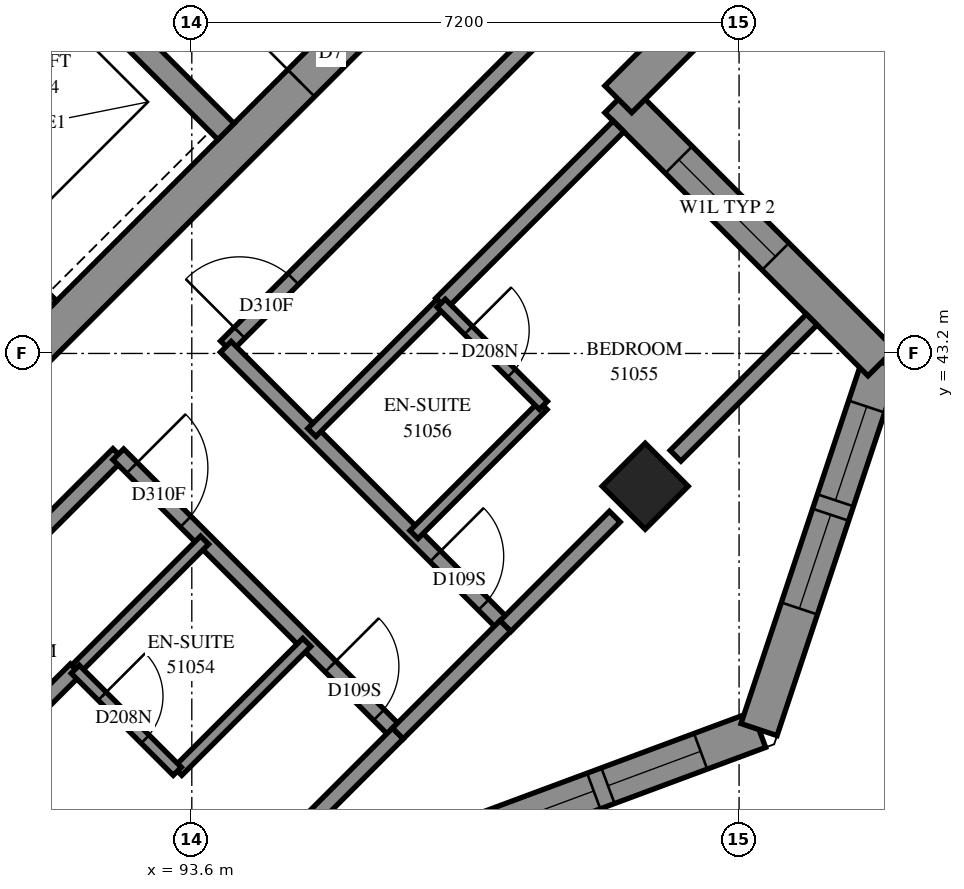
"""IFC4 building model, lengths in metres.
Left out: names, types, materials, properties, quantities, classifications, styles, units other than length and angle.
Written with IfcOpenShell. Run it as: python <this file> out.ifc"""

import sys

from ifc_helpers import new_model, si_unit, direction, frame, frame_2d, origin, origin_2d, place, context, subcontext, project, spatial, polyline, rectangle, outline, extrude, element, fill, save


model = new_model("IFC4")
c1 = context("Model", 3, precision=1e-05, world=origin(), true_north=direction((0.0, 1.0)))
c2 = subcontext(c1, "Body", "Model", "MODEL_VIEW")
j1 = project(units=[si_unit("LENGTHUNIT", "METRE"), si_unit("PLANEANGLEUNIT", "RADIAN")], contexts=[c1])
p1 = place(None, origin())
s1 = spatial("IfcSite", under=j1, at=p1, CompositionType="ELEMENT")
p2 = place(p1, origin())
s2 = spatial("IfcBuilding", under=s1, at=p2, CompositionType="ELEMENT")
p3 = place(p2, frame((0.0, 0.0, 189.6)))
s3 = spatial("IfcBuildingStorey", under=s2, at=p3, CompositionType="ELEMENT", Elevation=189.6)
p4 = place(p3, frame((99.565, 41.453, 0.0), z_axis=(0.0, 0.0, 1.0), x_axis=(0.7071067812, -0.7071067812, 0.0)))
e1 = element("IfcColumn", 1, at=p4, inside=s3, PredefinedType="COLUMN", context=c2, shape_type="SweptSolid", body=[
    extrude(rectangle(XDim=0.8, YDim=0.8, at=origin_2d()), origin(), (0.0, 0.0, 1.0), 3.1),
])
p5 = place(p3, frame((87.013, 38.731, -0.3), z_axis=(0.0, 0.0, 1.0), x_axis=(0.7071067812, 0.7071067812, 0.0)))
e2 = element("IfcWall", 2, at=p5, inside=s3, PredefinedType="SHEAR", context=c2, shape_type="SweptSolid", body=[
    extrude(rectangle(XDim=14.4, YDim=0.5, at=frame_2d((7.2, 0.0))), origin(), (0.0, 0.0, 1.0), 2.7),
])
p6 = place(p5, frame((4.55, 0.0, 0.3)))
e3 = element("IfcOpeningElement", 3, at=p6, cuts=e2, PredefinedType="OPENING", context=c2, shape_type="SweptSolid", body=[
    extrude(rectangle(XDim=1.1, YDim=2.1, at=frame_2d((0.55, 1.05))), frame((0.0, 0.26, 0.0), z_axis=(0.0, -1.0, 0.0), x_axis=(1.0, 0.0, 0.0)), (0.0, 0.0, 1.0), 0.52),
])
p7 = place(p5, frame((11.35, 0.0, 0.3)))
e4 = element("IfcOpeningElement", 4, at=p7, cuts=e2, PredefinedType="OPENING", context=c2, shape_type="SweptSolid", body=[
    extrude(rectangle(XDim=1.1, YDim=2.1, at=frame_2d((0.55, 1.05))), frame((0.0, 0.26, 0.0), z_axis=(0.0, -1.0, 0.0), x_axis=(1.0, 0.0, 0.0)), (0.0, 0.0, 1.0), 0.52),
])
p8 = place(p3, frame((81.534, 53.969, 0.0), z_axis=(0.0, 0.0, 1.0), x_axis=(0.707103309, -0.7071102534, 0.0)))
e5 = element("IfcWall", 5, at=p8, inside=s3, PredefinedType="SOLIDWALL", context=c2, shape_type="SweptSolid", body=[
    extrude(rectangle(XDim=14.4, YDim=0.3, at=frame_2d((7.2, 0.0))), origin(), (0.0, 0.0, 1.0), 3.1),
])
p9 = place(p8, frame((1.25, 0.0, 0.0)))
e6 = element("IfcOpeningElement", 6, at=p9, cuts=e5, PredefinedType="OPENING", context=c2, shape_type="SweptSolid", body=[
    extrude(rectangle(XDim=1.1, YDim=2.1, at=frame_2d((0.55, 1.05))), frame((0.0, 0.16, 0.0), z_axis=(0.0, -1.0, 0.0), x_axis=(1.0, 0.0, 0.0)), (0.0, 0.0, 1.0), 0.32),
])
p10 = place(p8, frame((4.85, 0.0, 0.0)))
e7 = element("IfcOpeningElement", 7, at=p10, cuts=e5, PredefinedType="OPENING", context=c2, shape_type="SweptSolid", body=[
    extrude(rectangle(XDim=1.1, YDim=2.1, at=frame_2d((0.55, 1.05))), frame((0.0, 0.16, 0.0), z_axis=(0.0, -1.0, 0.0), x_axis=(1.0, 0.0, 0.0)), (0.0, 0.0, 1.0), 0.32),
])
p11 = place(p8, frame((8.45, 0.0, 0.0)))
e8 = element("IfcOpeningElement", 8, at=p11, cuts=e5, PredefinedType="OPENING", context=c2, shape_type="SweptSolid", body=[
    extrude(rectangle(XDim=1.1, YDim=2.1, at=frame_2d((0.55, 1.05))), frame((0.0, 0.16, 0.0), z_axis=(0.0, -1.0, 0.0), x_axis=(1.0, 0.0, 0.0)), (0.0, 0.0, 1.0), 0.32),
])
p12 = place(p8, frame((12.05, 0.0, 0.0)))
e9 = element("IfcOpeningElement", 9, at=p12, cuts=e5, PredefinedType="OPENING", context=c2, shape_type="SweptSolid", body=[
    extrude(rectangle(XDim=1.1, YDim=2.1, at=frame_2d((0.55, 1.05))), frame((0.0, 0.16, 0.0), z_axis=(0.0, -1.0, 0.0), x_axis=(1.0, 0.0, 0.0)), (0.0, 0.0, 1.0), 0.32),
])
p13 = place(p3, frame((88.958, 51.211, 0.0), z_axis=(0.0, 0.0, 1.0), x_axis=(0.7070998367, -0.7071137256, 0.0)))
e10 = element("IfcWall", 10, at=p13, inside=s3, PredefinedType="SOLIDWALL", context=c2, shape_type="SweptSolid", body=[
    extrude(rectangle(XDim=7.2, YDim=0.3, at=frame_2d((3.6, 0.0))), origin(), (0.0, 0.0, 1.0), 3.1),
])
p14 = place(p3, frame((96.118, 36.415, 0.0), z_axis=(0.0, 0.0, 1.0), x_axis=(0.9374238577, 0.3481903374, 0.0)))
e11 = element("IfcWall", 11, at=p14, inside=s3, PredefinedType="SOLIDWALL", context=c2, shape_type="SweptSolid", body=[
    extrude(outline(polyline([(0.115, -0.25), (5.395, -0.25), (5.155, 0.25), (-0.115, 0.25), (0.115, -0.25)])), origin(), (0.0, 0.0, 1.0), 3.1),
])
p15 = place(p14, frame((1.655, 0.0, 0.45)))
e12 = element("IfcOpeningElement", 12, at=p15, cuts=e11, PredefinedType="OPENING", context=c2, shape_type="SweptSolid", body=[
    extrude(rectangle(XDim=1.3, YDim=2.5, at=frame_2d((0.65, 1.25))), frame((0.0, 0.26, 0.0), z_axis=(0.0, -1.0, 0.0), x_axis=(1.0, 0.0, 0.0)), (0.0, 0.0, 1.0), 0.52),
])
p16 = place(p14, frame((3.155, 0.0, 0.45)))
e13 = element("IfcOpeningElement", 13, at=p16, cuts=e11, PredefinedType="OPENING", context=c2, shape_type="SweptSolid", body=[
    extrude(rectangle(XDim=1.3, YDim=2.5, at=frame_2d((0.65, 1.25))), frame((0.0, 0.26, 0.0), z_axis=(0.0, -1.0, 0.0), x_axis=(1.0, 0.0, 0.0)), (0.0, 0.0, 1.0), 0.52),
])
p17 = place(p3, frame((101.062, 38.252, 0.0), z_axis=(0.0, 0.0, 1.0), x_axis=(0.3162395484, 0.9486793705, 0.0)))
e14 = element("IfcWall", 14, at=p17, inside=s3, PredefinedType="SOLIDWALL", context=c2, shape_type="SweptSolid", body=[
    extrude(outline(polyline([(-0.12, -0.25), (5.247, -0.25), (4.938, 0.25), (0.12, 0.25), (-0.12, -0.25)])), origin(), (0.0, 0.0, 1.0), 3.1),
])
p18 = place(p17, frame((1.68, 0.0, 0.45)))
e15 = element("IfcOpeningElement", 15, at=p18, cuts=e14, PredefinedType="OPENING", context=c2, shape_type="SweptSolid", body=[
    extrude(rectangle(XDim=1.3, YDim=2.5, at=frame_2d((0.65, 1.25))), frame((0.0, 0.26, 0.0), z_axis=(0.0, -1.0, 0.0), x_axis=(1.0, 0.0, 0.0)), (0.0, 0.0, 1.0), 0.52),
])
p19 = place(p17, frame((3.18, 0.0, 0.45)))
e16 = element("IfcOpeningElement", 16, at=p19, cuts=e14, PredefinedType="OPENING", context=c2, shape_type="SweptSolid", body=[
    extrude(rectangle(XDim=1.3, YDim=2.5, at=frame_2d((0.65, 1.25))), frame((0.0, 0.26, 0.0), z_axis=(0.0, -1.0, 0.0), x_axis=(1.0, 0.0, 0.0)), (0.0, 0.0, 1.0), 0.52),
])
p20 = place(p3, frame((102.673, 43.083, 0.0), z_axis=(0.0, 0.0, 1.0), x_axis=(-0.7071067812, 0.7071067812, 0.0)))
e17 = element("IfcWall", 17, at=p20, inside=s3, PredefinedType="SOLIDWALL", context=c2, shape_type="SweptSolid", body=[
    extrude(outline(polyline([(-0.154, -0.25), (4.646, -0.25), (5.146, 0.25), (0.154, 0.25), (-0.154, -0.25)])), origin(), (0.0, 0.0, 1.0), 3.1),
])
p21 = place(p20, frame((1.97, 0.0, 0.6)))
e18 = element("IfcOpeningElement", 18, at=p21, cuts=e17, PredefinedType="OPENING", context=c2, shape_type="SweptSolid", body=[
    extrude(rectangle(XDim=1.8, YDim=1.9, at=frame_2d((0.9, 0.95))), frame((0.0, 0.26, 0.0), z_axis=(0.0, -1.0, 0.0), x_axis=(1.0, 0.0, 0.0)), (0.0, 0.0, 1.0), 0.52),
])
p22 = place(p3, frame((99.211, 46.544, 0.0), z_axis=(0.0, 0.0, 1.0), x_axis=(0.7071156725, 0.7070978897, 0.0)))
e19 = element("IfcWall", 19, at=p22, inside=s3, PredefinedType="SOLIDWALL", context=c2, shape_type="SweptSolid", body=[
    extrude(outline(polyline([(0.25, -0.25), (5.95, -0.25), (5.297, 0.25), (-0.25, 0.25), (0.25, -0.25)])), origin(), (0.0, 0.0, 1.0), 3.1),
])
p23 = place(p22, frame((1.125, 0.0, 0.6)))
e20 = element("IfcOpeningElement", 20, at=p23, cuts=e19, PredefinedType="OPENING", context=c2, shape_type="SweptSolid", body=[
    extrude(rectangle(XDim=1.8, YDim=1.9, at=frame_2d((0.9, 0.95))), frame((0.0, 0.26, 0.0), z_axis=(0.0, -1.0, 0.0), x_axis=(1.0, 0.0, 0.0)), (0.0, 0.0, 1.0), 0.52),
])
p24 = place(p3, frame((84.971, 31.945, 0.0), z_axis=(0.0, 0.0, 1.0), x_axis=(0.7072312442, 0.7069822963, 0.0)))
e21 = element("IfcWall", 21, at=p24, inside=s3, PredefinedType="PARTITIONING", context=c2, shape_type="SweptSolid", body=[
    extrude(rectangle(XDim=10.042, YDim=0.2, at=frame_2d((5.021, 0.0))), origin(), (0.0, 0.0, 1.0), 3.1),
])
p25 = place(p3, frame((94.049, 43.293, 0.0), z_axis=(0.0, 0.0, 1.0), x_axis=(0.7071067812, 0.7071067812, 0.0)))
e22 = element("IfcWall", 22, at=p25, inside=s3, PredefinedType="PARTITIONING", context=c2, shape_type="SweptSolid", body=[
    extrude(rectangle(XDim=8.2, YDim=0.2, at=frame_2d((4.1, 0.0))), origin(), (0.0, 0.0, 1.0), 3.1),
])
p26 = place(p25, frame((0.252, 0.0, 0.0)))
e23 = element("IfcOpeningElement", 23, at=p26, cuts=e22, PredefinedType="OPENING", context=c2, shape_type="SweptSolid", body=[
    extrude(rectangle(XDim=1.0, YDim=2.1, at=frame_2d((0.5, 1.05))), frame((0.0, 0.11, 0.0), z_axis=(0.0, -1.0, 0.0), x_axis=(1.0, 0.0, 0.0)), (0.0, 0.0, 1.0), 0.22),
])
p27 = place(p3, frame((86.835, 36.079, 0.0), z_axis=(0.0, 0.0, 1.0), x_axis=(0.7071067812, 0.7071067812, 0.0)))
e24 = element("IfcWall", 24, at=p27, inside=s3, PredefinedType="PARTITIONING", context=c2, shape_type="SweptSolid", body=[
    extrude(rectangle(XDim=8.2, YDim=0.2, at=frame_2d((4.1, 0.0))), origin(), (0.0, 0.0, 1.0), 3.1),
])
p28 = place(p3, frame((94.047, 43.287, 0.0), z_axis=(0.0, 0.0, 1.0), x_axis=(0.7071067812, -0.7071067812, 0.0)))
e25 = element("IfcWall", 25, at=p28, inside=s3, PredefinedType="PARTITIONING", context=c2, shape_type="SweptSolid", body=[
    extrude(rectangle(XDim=5.199, YDim=0.2, at=frame_2d((2.599, 0.0))), origin(), (0.0, 0.0, 1.0), 3.1),
])
p29 = place(p28, frame((3.898, 0.0, 0.0)))
e26 = element("IfcOpeningElement", 26, at=p29, cuts=e25, PredefinedType="OPENING", context=c2, shape_type="SweptSolid", body=[
    extrude(rectangle(XDim=0.9, YDim=2.1, at=frame_2d((0.45, 1.05))), frame((0.0, 0.11, 0.0), z_axis=(0.0, -1.0, 0.0), x_axis=(1.0, 0.0, 0.0)), (0.0, 0.0, 1.0), 0.22),
])
p30 = place(p3, frame((92.633, 41.873, 0.0), z_axis=(0.0, 0.0, 1.0), x_axis=(0.7071067812, -0.7071067812, 0.0)))
e27 = element("IfcWall", 27, at=p30, inside=s3, PredefinedType="PARTITIONING", context=c2, shape_type="SweptSolid", body=[
    extrude(rectangle(XDim=5.199, YDim=0.2, at=frame_2d((2.599, 0.0))), origin(), (0.0, 0.0, 1.0), 3.1),
])
p31 = place(p30, frame((0.253, 0.0, 0.0)))
e28 = element("IfcOpeningElement", 28, at=p31, cuts=e27, PredefinedType="OPENING", context=c2, shape_type="SweptSolid", body=[
    extrude(rectangle(XDim=1.0, YDim=2.1, at=frame_2d((0.5, 1.05))), frame((0.0, 0.11, 0.0), z_axis=(0.0, -1.0, 0.0), x_axis=(1.0, 0.0, 0.0)), (0.0, 0.0, 1.0), 0.22),
])
p32 = place(p30, frame((3.948, 0.0, 0.0)))
e29 = element("IfcOpeningElement", 29, at=p32, cuts=e27, PredefinedType="OPENING", context=c2, shape_type="SweptSolid", body=[
    extrude(rectangle(XDim=0.9, YDim=2.1, at=frame_2d((0.45, 1.05))), frame((0.0, 0.11, 0.0), z_axis=(0.0, -1.0, 0.0), x_axis=(1.0, 0.0, 0.0)), (0.0, 0.0, 1.0), 0.22),
])
p33 = place(p3, frame((96.88, 43.856, 0.0), z_axis=(0.0, 0.0, 1.0), x_axis=(0.7074098182, 0.7068036142, 0.0)))
e30 = element("IfcWall", 30, at=p33, inside=s3, PredefinedType="PARTITIONING", context=c2, shape_type="SweptSolid", body=[
    extrude(rectangle(XDim=3.299, YDim=0.2, at=frame_2d((1.65, 0.0))), origin(), (0.0, 0.0, 1.0), 3.1),
])
p34 = place(p3, frame((99.964, 41.854, 0.0), z_axis=(0.0, 0.0, 1.0), x_axis=(0.7071265121, 0.7070870497, 0.0)))
e31 = element("IfcWall", 31, at=p34, inside=s3, PredefinedType="PARTITIONING", context=c2, shape_type="SweptSolid", body=[
    extrude(rectangle(XDim=2.534, YDim=0.2, at=frame_2d((1.267, 0.0))), origin(), (0.0, 0.0, 1.0), 3.1),
])
for number, where, z_axis, x_axis in (
    (32, (96.523, 40.817, 0.0), (0.0, 0.0, 1.0), (0.707, 0.707, 0.0)),
    (33, (95.179, 42.161, 0.0), (0.0, 0.0, 1.0), (0.707, 0.707, 0.0)),
):
    element("IfcWall", number, at=place(p3, frame(where, z_axis=z_axis, x_axis=x_axis)), inside=s3, PredefinedType="PARTITIONING", context=c2, shape_type="SweptSolid", body=[
        extrude(rectangle(XDim=2.401, YDim=0.15, at=frame_2d((1.201, 0.0))), origin(), (0.0, 0.0, 1.0), 3.1),
    ])
for number, where, z_axis, x_axis in (
    (34, (92.072, 39.046, 0.0), (0.0, 0.0, 1.0), (0.707, 0.708, 0.0)),
    (35, (93.415, 37.703, 0.0), (0.0, 0.0, 1.0), (0.708, 0.707, 0.0)),
):
    element("IfcWall", number, at=place(p3, frame(where, z_axis=z_axis, x_axis=x_axis)), inside=s3, PredefinedType="PARTITIONING", context=c2, shape_type="SweptSolid", body=[
        extrude(rectangle(XDim=2.4, YDim=0.15, at=frame_2d((1.2, 0.0))), origin(), (0.0, 0.0, 1.0), 3.1),
    ])
p35 = place(p3, frame((97.727, 39.613, 0.0), z_axis=(0.0, 0.0, 1.0), x_axis=(0.7066152229, 0.7075979979, 0.0)))
e36 = element("IfcWall", 36, at=p35, inside=s3, PredefinedType="PARTITIONING", context=c2, shape_type="SweptSolid", body=[
    extrude(rectangle(XDim=2.035, YDim=0.2, at=frame_2d((1.018, 0.0))), origin(), (0.0, 0.0, 1.0), 2.6),
])
p36 = place(p3, frame((94.873, 36.763, 0.0), z_axis=(0.0, 0.0, 1.0), x_axis=(0.7071067812, 0.7071067812, 0.0)))
e37 = element("IfcWall", 37, at=p36, inside=s3, PredefinedType="PARTITIONING", context=c2, shape_type="SweptSolid", body=[
    extrude(rectangle(XDim=2.034, YDim=0.2, at=frame_2d((1.017, 0.0))), origin(), (0.0, 0.0, 1.0), 2.6),
])
p37 = place(p3, frame((96.311, 38.201, 0.0), z_axis=(0.0, 0.0, 1.0), x_axis=(0.7071067812, 0.7071067812, 0.0)))
e38 = element("IfcWall", 38, at=p37, inside=s3, PredefinedType="PARTITIONING", context=c2, shape_type="SweptSolid", body=[
    extrude(rectangle(XDim=2.0, YDim=0.2, at=frame_2d((1.0, 0.0))), origin(), (0.0, 0.0, 1.0), 2.6),
])
p38 = place(p3, frame((96.881, 43.861, 0.0), z_axis=(0.0, 0.0, 1.0), x_axis=(0.7071067812, -0.7071067812, 0.0)))
e39 = element("IfcWall", 39, at=p38, inside=s3, PredefinedType="PARTITIONING", context=c2, shape_type="SweptSolid", body=[
    extrude(rectangle(XDim=1.901, YDim=0.15, at=frame_2d((0.95, 0.0))), origin(), (0.0, 0.0, 1.0), 3.1),
])
p39 = place(p38, frame((0.505, 0.0, 0.0)))
e40 = element("IfcOpeningElement", 40, at=p39, cuts=e39, PredefinedType="OPENING", context=c2, shape_type="SweptSolid", body=[
    extrude(rectangle(XDim=0.8, YDim=2.1, at=frame_2d((0.4, 1.05))), frame((0.0, 0.085, 0.0), z_axis=(0.0, -1.0, 0.0), x_axis=(1.0, 0.0, 0.0)), (0.0, 0.0, 1.0), 0.17),
])
p40 = place(p3, frame((92.067, 39.045, 0.0), z_axis=(0.0, 0.0, 1.0), x_axis=(0.7071067812, -0.7071067812, 0.0)))
e41 = element("IfcWall", 41, at=p40, inside=s3, PredefinedType="PARTITIONING", context=c2, shape_type="SweptSolid", body=[
    extrude(rectangle(XDim=1.898, YDim=0.15, at=frame_2d((0.949, 0.0))), origin(), (0.0, 0.0, 1.0), 3.1),
])
p41 = place(p40, frame((0.501, 0.0, 0.0)))
e42 = element("IfcOpeningElement", 42, at=p41, cuts=e41, PredefinedType="OPENING", context=c2, shape_type="SweptSolid", body=[
    extrude(rectangle(XDim=0.8, YDim=2.1, at=frame_2d((0.4, 1.05))), frame((0.0, 0.085, 0.0), z_axis=(0.0, -1.0, 0.0), x_axis=(1.0, 0.0, 0.0)), (0.0, 0.0, 1.0), 0.17),
])
p42 = place(p15, origin())
e43 = element("IfcWindow", 43, at=p42, inside=s3, PartitioningType="SINGLE_PANEL", PredefinedType="WINDOW", context=c2, shape_type="SweptSolid", body=[
    extrude(rectangle(XDim=1.3, YDim=2.5, at=frame_2d((0.65, 1.25))), frame((0.0, 0.18, 0.0), z_axis=(0.0, -1.0, 0.0), x_axis=(1.0, 0.0, 0.0)), (0.0, 0.0, 1.0), 0.06),
])
fill(e12, e43)
p43 = place(p16, origin())
e44 = element("IfcWindow", 44, at=p43, inside=s3, PartitioningType="SINGLE_PANEL", PredefinedType="WINDOW", context=c2, shape_type="SweptSolid", body=[
    extrude(rectangle(XDim=1.3, YDim=2.5, at=frame_2d((0.65, 1.25))), frame((0.0, 0.18, 0.0), z_axis=(0.0, -1.0, 0.0), x_axis=(1.0, 0.0, 0.0)), (0.0, 0.0, 1.0), 0.06),
])
fill(e13, e44)
p44 = place(p18, origin())
e45 = element("IfcWindow", 45, at=p44, inside=s3, PartitioningType="SINGLE_PANEL", PredefinedType="WINDOW", context=c2, shape_type="SweptSolid", body=[
    extrude(rectangle(XDim=1.3, YDim=2.5, at=frame_2d((0.65, 1.25))), frame((0.0, 0.18, 0.0), z_axis=(0.0, -1.0, 0.0), x_axis=(1.0, 0.0, 0.0)), (0.0, 0.0, 1.0), 0.06),
])
fill(e15, e45)
p45 = place(p19, origin())
e46 = element("IfcWindow", 46, at=p45, inside=s3, PartitioningType="SINGLE_PANEL", PredefinedType="WINDOW", context=c2, shape_type="SweptSolid", body=[
    extrude(rectangle(XDim=1.3, YDim=2.5, at=frame_2d((0.65, 1.25))), frame((0.0, 0.18, 0.0), z_axis=(0.0, -1.0, 0.0), x_axis=(1.0, 0.0, 0.0)), (0.0, 0.0, 1.0), 0.06),
])
fill(e16, e46)
p46 = place(p21, origin())
e47 = element("IfcWindow", 47, at=p46, inside=s3, PartitioningType="SINGLE_PANEL", PredefinedType="WINDOW", context=c2, shape_type="SweptSolid", body=[
    extrude(rectangle(XDim=1.8, YDim=1.9, at=frame_2d((0.9, 0.95))), frame((0.0, 0.18, 0.0), z_axis=(0.0, -1.0, 0.0), x_axis=(1.0, 0.0, 0.0)), (0.0, 0.0, 1.0), 0.06),
])
fill(e18, e47)
p47 = place(p7, origin())
e48 = element("IfcDoor", 48, at=p47, inside=s3, OperationType="SINGLE_SWING_RIGHT", PredefinedType="DOOR", context=c2, shape_type="SweptSolid", body=[
    extrude(rectangle(XDim=1.1, YDim=2.1, at=frame_2d((0.55, 1.05))), frame((0.0, 0.025, 0.0), z_axis=(0.0, -1.0, 0.0), x_axis=(1.0, 0.0, 0.0)), (0.0, 0.0, 1.0), 0.05),
])
fill(e4, e48)
p48 = place(p26, origin())
e49 = element("IfcDoor", 49, at=p48, inside=s3, OperationType="SINGLE_SWING_RIGHT", PredefinedType="DOOR", context=c2, shape_type="SweptSolid", body=[
    extrude(rectangle(XDim=1.0, YDim=2.1, at=frame_2d((0.5, 1.05))), frame((0.0, 0.025, 0.0), z_axis=(0.0, -1.0, 0.0), x_axis=(1.0, 0.0, 0.0)), (0.0, 0.0, 1.0), 0.05),
])
fill(e23, e49)
p49 = place(p31, origin())
e50 = element("IfcDoor", 50, at=p49, inside=s3, OperationType="SINGLE_SWING_RIGHT", PredefinedType="DOOR", context=c2, shape_type="SweptSolid", body=[
    extrude(rectangle(XDim=1.0, YDim=2.1, at=frame_2d((0.5, 1.05))), frame((0.0, 0.025, 0.0), z_axis=(0.0, -1.0, 0.0), x_axis=(1.0, 0.0, 0.0)), (0.0, 0.0, 1.0), 0.05),
])
fill(e28, e50)
p50 = place(p32, origin())
e51 = element("IfcDoor", 51, at=p50, inside=s3, OperationType="SINGLE_SWING_LEFT", PredefinedType="DOOR", context=c2, shape_type="SweptSolid", body=[
    extrude(rectangle(XDim=0.9, YDim=2.1, at=frame_2d((0.45, 1.05))), frame((0.0, 0.025, 0.0), z_axis=(0.0, -1.0, 0.0), x_axis=(1.0, 0.0, 0.0)), (0.0, 0.0, 1.0), 0.05),
])
fill(e29, e51)
p51 = place(p41, origin())
e52 = element("IfcDoor", 52, at=p51, inside=s3, OperationType="SINGLE_SWING_RIGHT", PredefinedType="DOOR", context=c2, shape_type="SweptSolid", body=[
    extrude(rectangle(XDim=0.8, YDim=2.1, at=frame_2d((0.4, 1.05))), frame((0.0, 0.025, 0.0), z_axis=(0.0, -1.0, 0.0), x_axis=(1.0, 0.0, 0.0)), (0.0, 0.0, 1.0), 0.05),
])
fill(e42, e52)
p52 = place(p29, origin())
e53 = element("IfcDoor", 53, at=p52, inside=s3, OperationType="SINGLE_SWING_RIGHT", PredefinedType="DOOR", context=c2, shape_type="SweptSolid", body=[
    extrude(rectangle(XDim=0.9, YDim=2.1, at=frame_2d((0.45, 1.05))), frame((0.0, 0.025, 0.0), z_axis=(0.0, -1.0, 0.0), x_axis=(1.0, 0.0, 0.0)), (0.0, 0.0, 1.0), 0.05),
])
fill(e26, e53)
p53 = place(p39, origin())
e54 = element("IfcDoor", 54, at=p53, inside=s3, OperationType="SINGLE_SWING_RIGHT", PredefinedType="DOOR", context=c2, shape_type="SweptSolid", body=[
    extrude(rectangle(XDim=0.8, YDim=2.1, at=frame_2d((0.4, 1.05))), frame((0.0, 0.025, 0.0), z_axis=(0.0, -1.0, 0.0), x_axis=(1.0, 0.0, 0.0)), (0.0, 0.0, 1.0), 0.05),
])
fill(e40, e54)
save(model, sys.argv[1])
